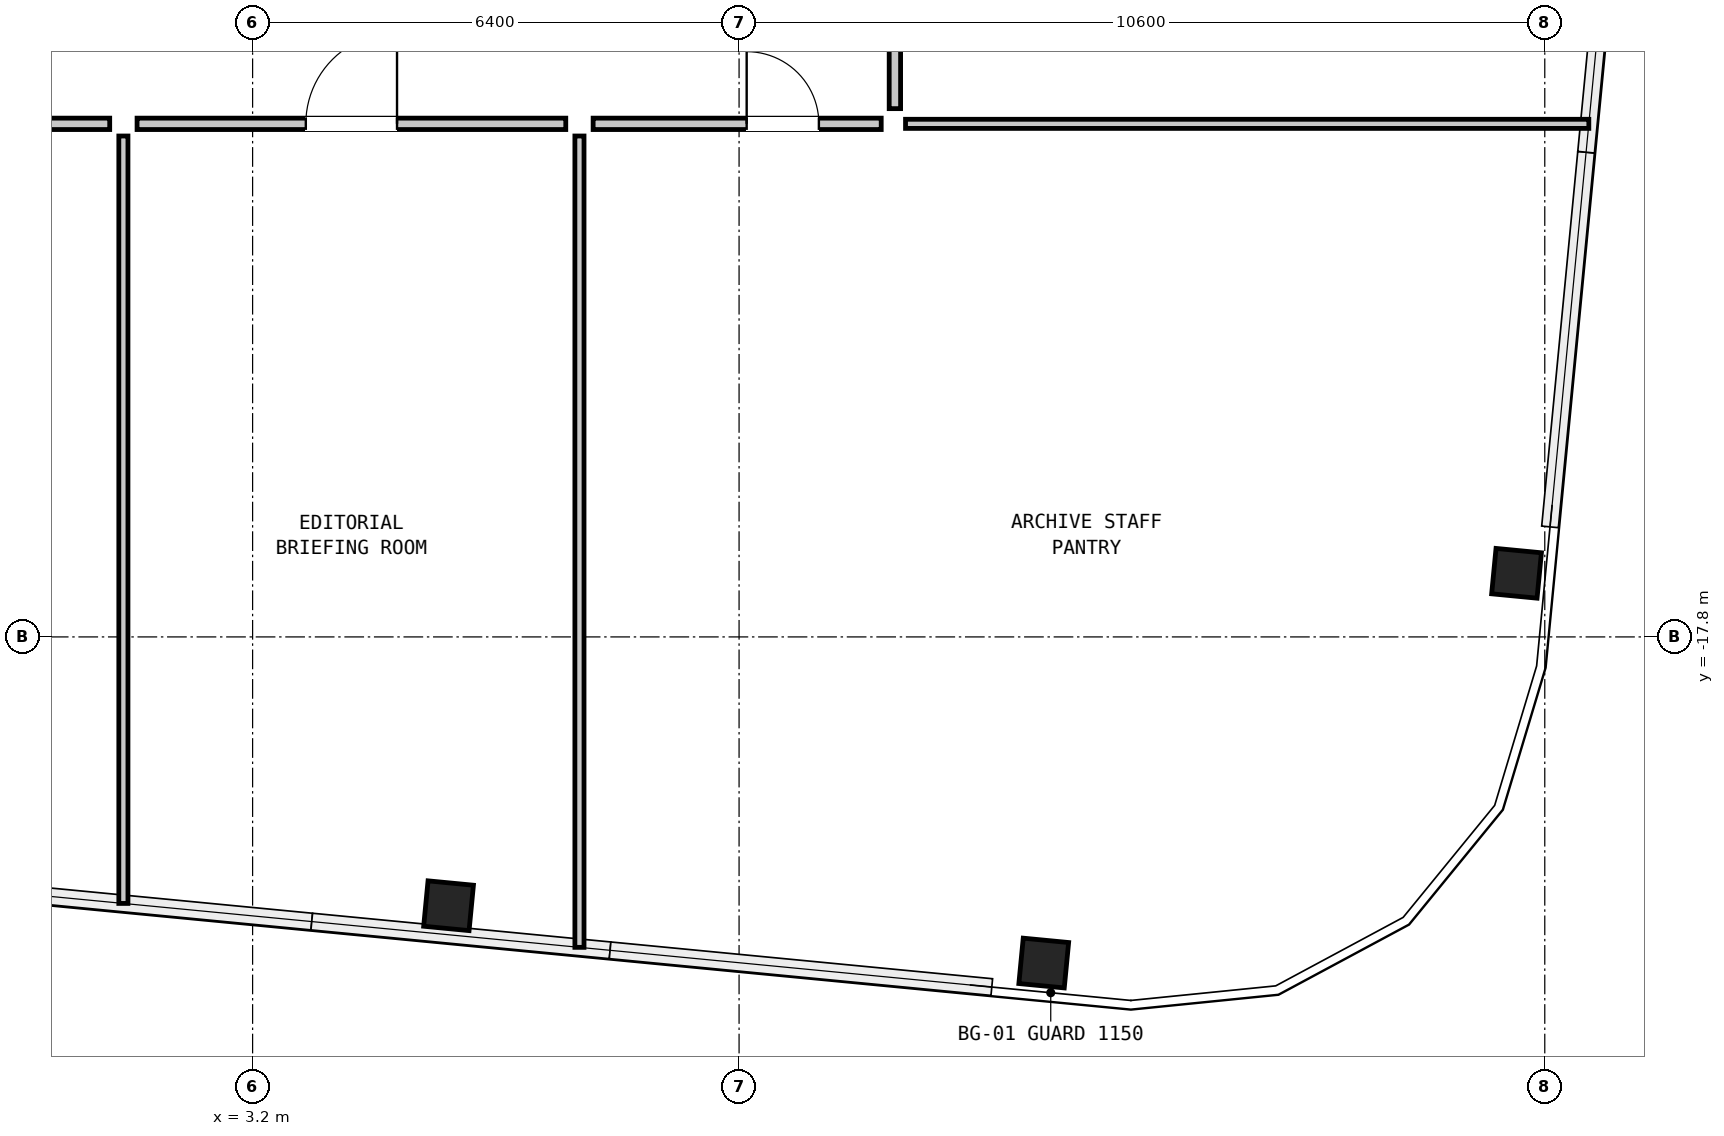
"""IFC4 building model, lengths in metres.
Left out: names, types, materials, properties, quantities, classifications, styles, units other than length and angle.
Written with IfcOpenShell. Run it as: python <this file> out.ifc"""

import sys

from ifc_helpers import new_model, si_unit, direction, frame, frame_2d, origin, origin_2d, place, context, subcontext, project, spatial, rectangle, hollow_rectangle, extrude, element, fill, save


model = new_model("IFC4")
c1 = context("Model", 3, precision=1e-05, world=origin(), true_north=direction((0.0, 1.0)))
c2 = subcontext(c1, "Body", "Model", "MODEL_VIEW")
j1 = project(units=[si_unit("LENGTHUNIT", "METRE"), si_unit("PLANEANGLEUNIT", "RADIAN")], contexts=[c1])
p1 = place(None, origin())
s1 = spatial("IfcSite", under=j1, at=p1, CompositionType="ELEMENT")
p2 = place(p1, origin())
s2 = spatial("IfcBuilding", under=s1, at=p2, CompositionType="ELEMENT")
p3 = place(p2, frame((0.0, 0.0, 264.2)))
s3 = spatial("IfcBuildingStorey", under=s2, at=p3, CompositionType="ELEMENT", Elevation=264.2)
for number, where, z_axis, x_axis in (
    (1, (5.778, -21.336, 0.0), (0.0, 0.0, 1.0), (0.995, -0.096, 0.0)),
    (2, (13.608, -22.09, 0.0), (0.0, 0.0, 1.0), (0.995, -0.096, 0.0)),
    (3, (19.829, -16.963, 0.0), (0.0, 0.0, 1.0), (0.096, 0.995, 0.0)),
):
    element("IfcColumn", number, at=place(p3, frame(where, z_axis=z_axis, x_axis=x_axis)), inside=s3, PredefinedType="COLUMN", context=c2, shape_type="SweptSolid", body=[
        extrude(hollow_rectangle(XDim=0.6, YDim=0.6, WallThickness=0.04, at=origin_2d()), origin(), (0.0, 0.0, 1.0), 3.05),
    ])
p4 = place(p3, frame((11.79, -11.05, 0.0), z_axis=(0.0, 0.0, 1.0), x_axis=(1.0, 0.0, 0.0)))
e4 = element("IfcWall", 4, at=p4, inside=s3, PredefinedType="PARTITIONING", context=c2, shape_type="SweptSolid", body=[
    extrude(rectangle(XDim=8.99, YDim=0.12, at=frame_2d((4.495, 0.0))), origin(), (0.0, 0.0, 1.0), 2.86),
])
p5 = place(p3, frame((1.5, -21.306, 0.0), z_axis=(0.0, 0.0, 1.0), x_axis=(0.0, 1.0, 0.0)))
e5 = element("IfcWall", 5, at=p5, inside=s3, PredefinedType="PARTITIONING", context=c2, shape_type="SweptSolid", body=[
    extrude(rectangle(XDim=10.096, YDim=0.12, at=frame_2d((5.048, 0.0))), origin(), (0.0, 0.0, 1.0), 2.86),
])
p6 = place(p3, frame((7.5, -21.884, 0.0), z_axis=(0.0, 0.0, 1.0), x_axis=(0.0, 1.0, 0.0)))
e6 = element("IfcWall", 6, at=p6, inside=s3, PredefinedType="PARTITIONING", context=c2, shape_type="SweptSolid", body=[
    extrude(rectangle(XDim=10.674, YDim=0.12, at=frame_2d((5.337, 0.0))), origin(), (0.0, 0.0, 1.0), 2.86),
])
p7 = place(p3, frame((-5.82, -11.05, 0.0), z_axis=(0.0, 0.0, 1.0), x_axis=(1.0, 0.0, 0.0)))
e7 = element("IfcWall", 7, at=p7, inside=s3, PredefinedType="PARTITIONING", context=c2, shape_type="SweptSolid", body=[
    extrude(rectangle(XDim=7.14, YDim=0.15, at=frame_2d((3.57, 0.0))), origin(), (0.0, 0.0, 1.0), 2.86),
])
p8 = place(p7, frame((3.095, 0.0, 0.0)))
e8 = element("IfcOpeningElement", 8, at=p8, cuts=e7, PredefinedType="OPENING", context=c2, shape_type="SweptSolid", body=[
    extrude(rectangle(XDim=0.95, YDim=2.1, at=frame_2d((0.475, 1.05))), frame((0.0, 0.087, 0.0), z_axis=(0.0, -1.0, 0.0), x_axis=(1.0, 0.0, 0.0)), (0.0, 0.0, 1.0), 0.174),
])
p9 = place(p3, frame((1.68, -11.05, 0.0), z_axis=(0.0, 0.0, 1.0), x_axis=(1.0, 0.0, 0.0)))
e9 = element("IfcWall", 9, at=p9, inside=s3, PredefinedType="PARTITIONING", context=c2, shape_type="SweptSolid", body=[
    extrude(rectangle(XDim=5.64, YDim=0.15, at=frame_2d((2.82, 0.0))), origin(), (0.0, 0.0, 1.0), 2.86),
])
p10 = place(p9, frame((2.22, 0.0, 0.0)))
e10 = element("IfcOpeningElement", 10, at=p10, cuts=e9, PredefinedType="OPENING", context=c2, shape_type="SweptSolid", body=[
    extrude(rectangle(XDim=1.2, YDim=2.1, at=frame_2d((0.6, 1.05))), frame((0.0, 0.087, 0.0), z_axis=(0.0, -1.0, 0.0), x_axis=(1.0, 0.0, 0.0)), (0.0, 0.0, 1.0), 0.174),
])
p11 = place(p3, frame((7.68, -11.05, 0.0), z_axis=(0.0, 0.0, 1.0), x_axis=(1.0, 0.0, 0.0)))
e11 = element("IfcWall", 11, at=p11, inside=s3, PredefinedType="PARTITIONING", context=c2, shape_type="SweptSolid", body=[
    extrude(rectangle(XDim=3.79, YDim=0.15, at=frame_2d((1.895, 0.0))), origin(), (0.0, 0.0, 1.0), 2.86),
])
p12 = place(p11, frame((2.02, 0.0, 0.0)))
e12 = element("IfcOpeningElement", 12, at=p12, cuts=e11, PredefinedType="OPENING", context=c2, shape_type="SweptSolid", body=[
    extrude(rectangle(XDim=0.95, YDim=2.1, at=frame_2d((0.475, 1.05))), frame((0.0, 0.087, 0.0), z_axis=(0.0, -1.0, 0.0), x_axis=(1.0, 0.0, 0.0)), (0.0, 0.0, 1.0), 0.174),
])
p13 = place(p3, frame((11.65, -10.85, 0.0), z_axis=(0.0, 0.0, 1.0), x_axis=(0.0, 1.0, 0.0)))
e13 = element("IfcWall", 13, at=p13, inside=s3, PredefinedType="PARTITIONING", context=c2, shape_type="SweptSolid", body=[
    extrude(rectangle(XDim=8.29, YDim=0.15, at=frame_2d((4.145, 0.0))), origin(), (0.0, 0.0, 1.0), 2.86),
])
p14 = place(p13, frame((3.67, 0.0, 0.0)))
e14 = element("IfcOpeningElement", 14, at=p14, cuts=e13, PredefinedType="OPENING", context=c2, shape_type="SweptSolid", body=[
    extrude(rectangle(XDim=0.95, YDim=2.1, at=frame_2d((0.475, 1.05))), frame((0.0, 0.087, 0.0), z_axis=(0.0, -1.0, 0.0), x_axis=(1.0, 0.0, 0.0)), (0.0, 0.0, 1.0), 0.174),
])
p15 = place(p10, origin())
e15 = element("IfcDoor", 15, at=p15, inside=s3, OperationType="SINGLE_SWING_RIGHT", PredefinedType="DOOR", context=c2, shape_type="SweptSolid", body=[
    extrude(rectangle(XDim=1.2, YDim=2.1, at=frame_2d((0.6, 1.05))), frame((0.0, 0.025, 0.0), z_axis=(0.0, -1.0, 0.0), x_axis=(1.0, 0.0, 0.0)), (0.0, 0.0, 1.0), 0.05),
])
fill(e10, e15)
p16 = place(p12, origin())
e16 = element("IfcDoor", 16, at=p16, inside=s3, OperationType="SINGLE_SWING_LEFT", PredefinedType="DOOR", context=c2, shape_type="SweptSolid", body=[
    extrude(rectangle(XDim=0.95, YDim=2.1, at=frame_2d((0.475, 1.05))), frame((0.0, 0.025, 0.0), z_axis=(0.0, -1.0, 0.0), x_axis=(1.0, 0.0, 0.0)), (0.0, 0.0, 1.0), 0.05),
])
fill(e12, e16)
save(model, sys.argv[1])
